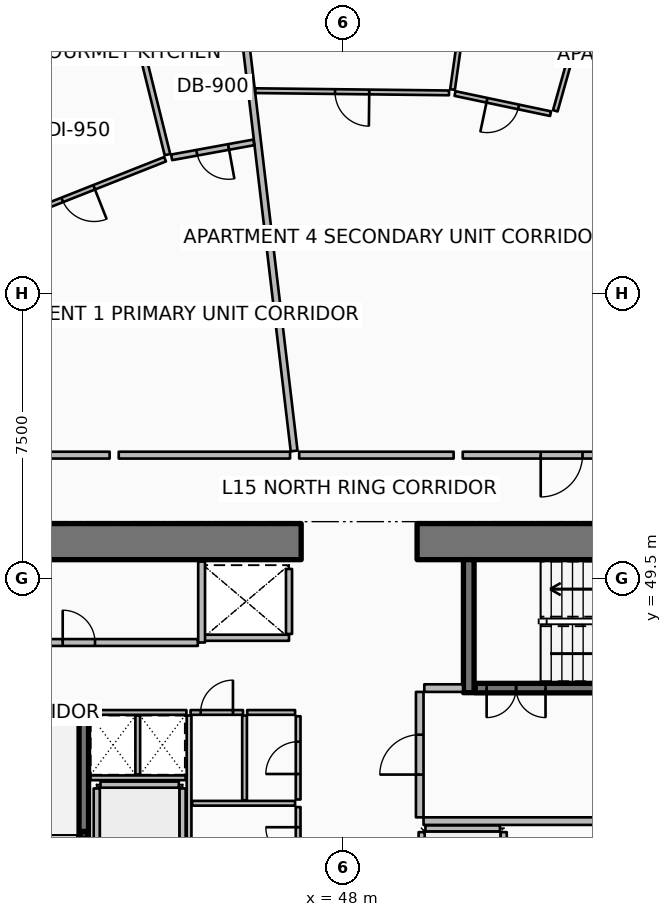
"""IFC4 building model, lengths in metres.
Left out: names, types, materials, properties, quantities, classifications, styles, units other than length and angle.
Written with IfcOpenShell. Run it as: python <this file> out.ifc"""

import sys

from ifc_helpers import new_model, si_unit, direction, frame, frame_2d, origin, origin_2d, place, context, subcontext, project, spatial, rectangle, hollow_rectangle, extrude, element, fill, save


model = new_model("IFC4")
c1 = context("Model", 3, precision=1e-05, world=origin(), true_north=direction((0.0, 1.0)))
c2 = subcontext(c1, "Body", "Model", "MODEL_VIEW")
j1 = project(units=[si_unit("LENGTHUNIT", "METRE"), si_unit("PLANEANGLEUNIT", "RADIAN")], contexts=[c1])
p1 = place(None, origin())
s1 = spatial("IfcSite", under=j1, at=p1, CompositionType="ELEMENT")
p2 = place(p1, origin())
s2 = spatial("IfcBuilding", under=s1, at=p2, CompositionType="ELEMENT")
p3 = place(p2, frame((0.0, 0.0, 63.9)))
s3 = spatial("IfcBuildingStorey", under=s2, at=p3, CompositionType="ELEMENT", Elevation=63.9)
p4 = place(p3, frame((36.85, 50.475, 0.0), z_axis=(0.0, 0.0, 1.0), x_axis=(1.0, 0.0, 0.0)))
e1 = element("IfcWall", 1, at=p4, inside=s3, PredefinedType="SHEAR", context=c2, shape_type="SweptSolid", body=[
    extrude(rectangle(XDim=10.05, YDim=0.95, at=frame_2d((5.025, 0.0))), origin(), (0.0, 0.0, 1.0), 3.75),
])
p5 = place(p3, frame((49.95, 50.475, 0.0), z_axis=(0.0, 0.0, 1.0), x_axis=(1.0, 0.0, 0.0)))
e2 = element("IfcWall", 2, at=p5, inside=s3, PredefinedType="SHEAR", context=c2, shape_type="SweptSolid", body=[
    extrude(rectangle(XDim=10.05, YDim=0.95, at=frame_2d((5.025, 0.0))), origin(), (0.0, 0.0, 1.0), 3.75),
])
for number, where, z_axis, x_axis in (
    (3, (37.8, 45.94, 0.0), (0.0, 0.0, 1.0), (1.0, 0.0, 0.0)),
    (4, (51.31, 46.5, 0.0), (0.0, 0.0, 1.0), (0.0, 1.0, 0.0)),
):
    element("IfcWall", number, at=place(p3, frame(where, z_axis=z_axis, x_axis=x_axis)), inside=s3, PredefinedType="SHEAR", context=c2, shape_type="SweptSolid", body=[
        extrude(rectangle(XDim=3.5, YDim=0.28, at=frame_2d((1.75, 0.0))), origin(), (0.0, 0.0, 1.0), 3.75),
    ])
p6 = place(p3, frame((41.18, 42.75, 0.0), z_axis=(0.0, 0.0, 1.0), x_axis=(1.0, 0.0, 0.0)))
e5 = element("IfcColumn", 5, at=p6, inside=s3, PredefinedType="COLUMN", context=c2, shape_type="SweptSolid", body=[
    extrude(hollow_rectangle(XDim=0.2, YDim=0.2, WallThickness=0.01, InnerFilletRadius=0.01, OuterFilletRadius=0.02, at=origin_2d()), origin(), (0.0, 0.0, 1.0), 1.67),
])
p7 = place(p3, frame((41.18, 38.22, 0.0), z_axis=(0.0, 0.0, 1.0), x_axis=(0.0, 1.0, 0.0)))
e6 = element("IfcWall", 6, at=p7, inside=s3, PredefinedType="SOLIDWALL", context=c2, shape_type="SweptSolid", body=[
    extrude(rectangle(XDim=7.56, YDim=0.25, at=frame_2d((3.78, 0.0))), origin(), (0.0, 0.0, 1.0), 3.5),
])
p8 = place(p7, frame((0.3, 0.0, 0.0)))
e7 = element("IfcOpeningElement", 7, at=p8, cuts=e6, PredefinedType="OPENING", context=c2, shape_type="SweptSolid", body=[
    extrude(rectangle(XDim=1.55, YDim=2.15, at=frame_2d((0.775, 1.075))), frame((0.0, 0.135, 0.0), z_axis=(0.0, -1.0, 0.0), x_axis=(1.0, 0.0, 0.0)), (0.0, 0.0, 1.0), 0.27),
])
p9 = place(p3, frame((51.48, 46.62, 0.0), z_axis=(0.0, 0.0, 1.0), x_axis=(1.0, 0.0, 0.0)))
e8 = element("IfcWall", 8, at=p9, inside=s3, PredefinedType="SOLIDWALL", context=c2, shape_type="SweptSolid", body=[
    extrude(rectangle(XDim=7.54, YDim=0.25, at=frame_2d((3.77, 0.0))), origin(), (0.0, 0.0, 1.0), 3.5),
])
p10 = place(p9, frame((0.3, 0.0, 0.0)))
e9 = element("IfcOpeningElement", 9, at=p10, cuts=e8, PredefinedType="OPENING", context=c2, shape_type="SweptSolid", body=[
    extrude(rectangle(XDim=1.55, YDim=2.15, at=frame_2d((0.775, 1.075))), frame((0.0, 0.135, 0.0), z_axis=(0.0, -1.0, 0.0), x_axis=(1.0, 0.0, 0.0)), (0.0, 0.0, 1.0), 0.27),
])
p11 = place(p3, frame((46.58, 47.945, 0.0), z_axis=(0.0, 0.0, 1.0), x_axis=(-1.0, 0.0, 0.0)))
e10 = element("IfcWall", 10, at=p11, inside=s3, PredefinedType="PARTITIONING", context=c2, shape_type="SweptSolid", body=[
    extrude(rectangle(XDim=2.26, YDim=0.16, at=frame_2d((1.13, 0.0))), origin(), (0.0, 0.0, 1.0), 3.5),
])
p12 = place(p3, frame((46.58, 48.045, 0.0), z_axis=(0.0, 0.0, 1.0), x_axis=(0.0, 1.0, 0.0)))
e11 = element("IfcWall", 11, at=p12, inside=s3, PredefinedType="PARTITIONING", context=c2, shape_type="SweptSolid", body=[
    extrude(rectangle(XDim=1.71, YDim=0.16, at=frame_2d((0.855, 0.0))), origin(), (0.0, 0.0, 1.0), 3.5),
])
for number, where, z_axis, x_axis in (
    (12, (43.78, 41.72, 0.0), (0.0, 0.0, 1.0), (0.0, 1.0, 0.0)),
    (13, (41.52, 41.72, 0.0), (0.0, 0.0, 1.0), (0.0, 1.0, 0.0)),
):
    element("IfcWall", number, at=place(p3, frame(where, z_axis=z_axis, x_axis=x_axis)), inside=s3, PredefinedType="PARTITIONING", context=c2, shape_type="SweptSolid", body=[
        extrude(rectangle(XDim=2.26, YDim=0.16, at=frame_2d((1.13, 0.0))), origin(), (0.0, 0.0, 1.0), 3.5),
    ])
p13 = place(p3, frame((41.62, 44.08, 0.0), z_axis=(0.0, 0.0, 1.0), x_axis=(1.0, 0.0, 0.0)))
e14 = element("IfcWall", 14, at=p13, inside=s3, PredefinedType="PARTITIONING", context=c2, shape_type="SweptSolid", body=[
    extrude(rectangle(XDim=2.06, YDim=0.16, at=frame_2d((1.03, 0.0))), origin(), (0.0, 0.0, 1.0), 3.5),
])
for number, where, z_axis, x_axis in (
    (15, (52.23, 40.67, 0.0), (0.0, 0.0, 1.0), (0.0, 1.0, 0.0)),
    (16, (50.07, 40.67, 0.0), (0.0, 0.0, 1.0), (0.0, 1.0, 0.0)),
):
    element("IfcWall", number, at=place(p3, frame(where, z_axis=z_axis, x_axis=x_axis)), inside=s3, PredefinedType="PARTITIONING", context=c2, shape_type="SweptSolid", body=[
        extrude(rectangle(XDim=2.16, YDim=0.16, at=frame_2d((1.08, 0.0))), origin(), (0.0, 0.0, 1.0), 3.5),
    ])
p14 = place(p3, frame((50.17, 42.93, 0.0), z_axis=(0.0, 0.0, 1.0), x_axis=(1.0, 0.0, 0.0)))
e17 = element("IfcWall", 17, at=p14, inside=s3, PredefinedType="PARTITIONING", context=c2, shape_type="SweptSolid", body=[
    extrude(rectangle(XDim=1.96, YDim=0.16, at=frame_2d((0.98, 0.0))), origin(), (0.0, 0.0, 1.0), 3.5),
])
p15 = place(p3, frame((37.92, 47.82, 0.0), z_axis=(0.0, 0.0, 1.0), x_axis=(1.0, 0.0, 0.0)))
e18 = element("IfcWall", 18, at=p15, inside=s3, PredefinedType="PARTITIONING", context=c2, shape_type="SweptSolid", body=[
    extrude(rectangle(XDim=6.26, YDim=0.18, at=frame_2d((3.13, 0.0))), origin(), (0.0, 0.0, 1.0), 3.5),
])
p16 = place(p15, frame((2.705, 0.0, 0.0)))
e19 = element("IfcOpeningElement", 19, at=p16, cuts=e18, PredefinedType="OPENING", context=c2, shape_type="SweptSolid", body=[
    extrude(rectangle(XDim=0.85, YDim=2.06, at=frame_2d((0.425, 1.03))), frame((0.0, 0.1, 0.0), z_axis=(0.0, -1.0, 0.0), x_axis=(1.0, 0.0, 0.0)), (0.0, 0.0, 1.0), 0.2),
])
p17 = place(p3, frame((44.28, 47.82, 0.0), z_axis=(0.0, 0.0, 1.0), x_axis=(0.0, 1.0, 0.0)))
e20 = element("IfcWall", 20, at=p17, inside=s3, PredefinedType="PARTITIONING", context=c2, shape_type="SweptSolid", body=[
    extrude(rectangle(XDim=2.13, YDim=0.18, at=frame_2d((1.065, 0.0))), origin(), (0.0, 0.0, 1.0), 3.5),
])
p18 = place(p3, frame((50.12, 43.12, 0.0), z_axis=(0.0, 0.0, 1.0), x_axis=(1.0, 0.0, 0.0)))
e21 = element("IfcWall", 21, at=p18, inside=s3, PredefinedType="PARTITIONING", context=c2, shape_type="SweptSolid", body=[
    extrude(rectangle(XDim=8.88, YDim=0.2, at=frame_2d((4.44, 0.0))), origin(), (0.0, 0.0, 1.0), 3.5),
])
p19 = place(p3, frame((50.14, 46.62, 0.0), z_axis=(0.0, 0.0, 1.0), x_axis=(1.0, 0.0, 0.0)))
e22 = element("IfcWall", 22, at=p19, inside=s3, PredefinedType="PARTITIONING", context=c2, shape_type="SweptSolid", body=[
    extrude(rectangle(XDim=1.02, YDim=0.2, at=frame_2d((0.51, 0.0))), origin(), (0.0, 0.0, 1.0), 3.5),
])
p20 = place(p3, frame((50.02, 43.22, 0.0), z_axis=(0.0, 0.0, 1.0), x_axis=(0.0, 1.0, 0.0)))
e23 = element("IfcWall", 23, at=p20, inside=s3, PredefinedType="PARTITIONING", context=c2, shape_type="SweptSolid", body=[
    extrude(rectangle(XDim=3.3, YDim=0.2, at=frame_2d((1.65, 0.0))), origin(), (0.0, 0.0, 1.0), 3.5),
])
p21 = place(p20, frame((1.125, 0.0, 0.0)))
e24 = element("IfcOpeningElement", 24, at=p21, cuts=e23, PredefinedType="OPENING", context=c2, shape_type="SweptSolid", body=[
    extrude(rectangle(XDim=1.05, YDim=2.1, at=frame_2d((0.525, 1.05))), frame((0.0, 0.11, 0.0), z_axis=(0.0, -1.0, 0.0), x_axis=(1.0, 0.0, 0.0)), (0.0, 0.0, 1.0), 0.22),
])
p22 = place(p3, frame((41.36, 44.26, 0.0), z_axis=(0.0, 0.0, 1.0), x_axis=(1.0, 0.0, 0.0)))
e25 = element("IfcWall", 25, at=p22, inside=s3, PredefinedType="PARTITIONING", context=c2, shape_type="SweptSolid", body=[
    extrude(rectangle(XDim=2.5, YDim=0.125, at=frame_2d((1.25, 0.0))), origin(), (0.0, 0.0, 1.0), 2.94),
])
p23 = place(p3, frame((42.6, 44.35, 0.0), z_axis=(0.0, 0.0, 1.0), x_axis=(0.0, 1.0, 0.0)))
e26 = element("IfcWall", 26, at=p23, inside=s3, PredefinedType="PARTITIONING", context=c2, shape_type="SweptSolid", body=[
    extrude(rectangle(XDim=1.55, YDim=0.125, at=frame_2d((0.775, 0.0))), origin(), (0.0, 0.0, 1.0), 2.94),
])
p24 = place(p3, frame((43.95, 41.58, 0.0), z_axis=(0.0, 0.0, 1.0), x_axis=(0.0, 1.0, 0.0)))
e27 = element("IfcWall", 27, at=p24, inside=s3, PredefinedType="PARTITIONING", context=c2, shape_type="SweptSolid", body=[
    extrude(rectangle(XDim=4.32, YDim=0.125, at=frame_2d((2.16, 0.0))), origin(), (0.0, 0.0, 1.0), 2.94),
])
p25 = place(p3, frame((44.03, 43.59, 0.0), z_axis=(0.0, 0.0, 1.0), x_axis=(1.0, 0.0, 0.0)))
e28 = element("IfcWall", 28, at=p25, inside=s3, PredefinedType="PARTITIONING", context=c2, shape_type="SweptSolid", body=[
    extrude(rectangle(XDim=2.71, YDim=0.125, at=frame_2d((1.355, 0.0))), origin(), (0.0, 0.0, 1.0), 2.94),
])
p26 = place(p3, frame((45.41, 43.67, 0.0), z_axis=(0.0, 0.0, 1.0), x_axis=(0.0, 1.0, 0.0)))
e29 = element("IfcWall", 29, at=p26, inside=s3, PredefinedType="PARTITIONING", context=c2, shape_type="SweptSolid", body=[
    extrude(rectangle(XDim=2.23, YDim=0.125, at=frame_2d((1.115, 0.0))), origin(), (0.0, 0.0, 1.0), 2.94),
])
p27 = place(p3, frame((46.82, 41.58, 0.0), z_axis=(0.0, 0.0, 1.0), x_axis=(0.0, 1.0, 0.0)))
e30 = element("IfcWall", 30, at=p27, inside=s3, PredefinedType="PARTITIONING", context=c2, shape_type="SweptSolid", body=[
    extrude(rectangle(XDim=1.91, YDim=0.125, at=frame_2d((0.955, 0.0))), origin(), (0.0, 0.0, 1.0), 2.94),
])
p28 = place(p27, frame((0.53, 0.0, 0.0)))
e31 = element("IfcOpeningElement", 31, at=p28, cuts=e30, PredefinedType="OPENING", context=c2, shape_type="SweptSolid", body=[
    extrude(rectangle(XDim=0.85, YDim=2.06, at=frame_2d((0.425, 1.03))), frame((0.0, 0.073, 0.0), z_axis=(0.0, -1.0, 0.0), x_axis=(1.0, 0.0, 0.0)), (0.0, 0.0, 1.0), 0.145),
])
p29 = place(p3, frame((46.82, 43.69, 0.0), z_axis=(0.0, 0.0, 1.0), x_axis=(0.0, 1.0, 0.0)))
e32 = element("IfcWall", 32, at=p29, inside=s3, PredefinedType="PARTITIONING", context=c2, shape_type="SweptSolid", body=[
    extrude(rectangle(XDim=2.19, YDim=0.125, at=frame_2d((1.095, 0.0))), origin(), (0.0, 0.0, 1.0), 2.94),
])
p30 = place(p29, frame((0.67, 0.0, 0.0)))
e33 = element("IfcOpeningElement", 33, at=p30, cuts=e32, PredefinedType="OPENING", context=c2, shape_type="SweptSolid", body=[
    extrude(rectangle(XDim=0.85, YDim=2.06, at=frame_2d((0.425, 1.03))), frame((0.0, 0.073, 0.0), z_axis=(0.0, -1.0, 0.0), x_axis=(1.0, 0.0, 0.0)), (0.0, 0.0, 1.0), 0.145),
])
p31 = place(p3, frame((41.35, 45.98, 0.0), z_axis=(0.0, 0.0, 1.0), x_axis=(1.0, 0.0, 0.0)))
e34 = element("IfcWall", 34, at=p31, inside=s3, PredefinedType="PARTITIONING", context=c2, shape_type="SweptSolid", body=[
    extrude(rectangle(XDim=2.53, YDim=0.125, at=frame_2d((1.265, 0.0))), origin(), (0.0, 0.0, 1.0), 2.94),
])
p32 = place(p3, frame((43.99, 45.98, 0.0), z_axis=(0.0, 0.0, 1.0), x_axis=(1.0, 0.0, 0.0)))
e35 = element("IfcWall", 35, at=p32, inside=s3, PredefinedType="PARTITIONING", context=c2, shape_type="SweptSolid", body=[
    extrude(rectangle(XDim=1.38, YDim=0.125, at=frame_2d((0.69, 0.0))), origin(), (0.0, 0.0, 1.0), 2.94),
])
p33 = place(p32, frame((0.265, 0.0, 0.0)))
e36 = element("IfcOpeningElement", 36, at=p33, cuts=e35, PredefinedType="OPENING", context=c2, shape_type="SweptSolid", body=[
    extrude(rectangle(XDim=0.85, YDim=2.06, at=frame_2d((0.425, 1.03))), frame((0.0, 0.073, 0.0), z_axis=(0.0, -1.0, 0.0), x_axis=(1.0, 0.0, 0.0)), (0.0, 0.0, 1.0), 0.145),
])
p34 = place(p3, frame((45.48, 45.98, 0.0), z_axis=(0.0, 0.0, 1.0), x_axis=(1.0, 0.0, 0.0)))
e37 = element("IfcWall", 37, at=p34, inside=s3, PredefinedType="PARTITIONING", context=c2, shape_type="SweptSolid", body=[
    extrude(rectangle(XDim=1.26, YDim=0.125, at=frame_2d((0.63, 0.0))), origin(), (0.0, 0.0, 1.0), 2.94),
])
p35 = place(p3, frame((46.715, 52.859, 0.0), z_axis=(0.0, 0.0, 1.0), x_axis=(-0.117534950089, 0.993068746617, 0.0)))
e38 = element("IfcWall", 38, at=p35, inside=s3, PredefinedType="PARTITIONING", context=c2, shape_type="SweptSolid", body=[
    extrude(rectangle(XDim=14.661, YDim=0.18, at=frame_2d((7.33, 0.0))), origin(), (0.0, 0.0, 1.0), 2.867),
])
p36 = place(p3, frame((41.86, 52.75, 0.0), z_axis=(0.0, 0.0, 1.0), x_axis=(-1.0, 0.0, 0.0)))
e39 = element("IfcWall", 39, at=p36, inside=s3, PredefinedType="PARTITIONING", context=c2, shape_type="SweptSolid", body=[
    extrude(rectangle(XDim=6.69, YDim=0.18, at=frame_2d((3.345, 0.0))), origin(), (0.0, 0.0, 1.0), 2.867),
])
p37 = place(p36, frame((2.795, 0.0, 0.0)))
e40 = element("IfcOpeningElement", 40, at=p37, cuts=e39, PredefinedType="OPENING", context=c2, shape_type="SweptSolid", body=[
    extrude(rectangle(XDim=1.1, YDim=2.1, at=frame_2d((0.55, 1.05))), frame((0.0, 0.1, 0.0), z_axis=(0.0, -1.0, 0.0), x_axis=(1.0, 0.0, 0.0)), (0.0, 0.0, 1.0), 0.2),
])
p38 = place(p3, frame((46.608, 52.75, 0.0), z_axis=(0.0, 0.0, 1.0), x_axis=(-1.0, 0.0, 0.0)))
e41 = element("IfcWall", 41, at=p38, inside=s3, PredefinedType="PARTITIONING", context=c2, shape_type="SweptSolid", body=[
    extrude(rectangle(XDim=4.508, YDim=0.18, at=frame_2d((2.254, 0.0))), origin(), (0.0, 0.0, 1.0), 2.867),
])
p39 = place(p3, frame((45.653, 60.979, 0.0), z_axis=(0.0, 0.0, 1.0), x_axis=(-0.983791601568, -0.179315600783, 0.0)))
e42 = element("IfcWall", 42, at=p39, inside=s3, PredefinedType="PARTITIONING", context=c2, shape_type="SweptSolid", body=[
    extrude(rectangle(XDim=2.198, YDim=0.15, at=frame_2d((1.099, 0.0))), origin(), (0.0, 0.0, 1.0), 2.867),
])
p40 = place(p39, frame((0.674, 0.0, 0.0)))
e43 = element("IfcOpeningElement", 43, at=p40, cuts=e42, PredefinedType="OPENING", context=c2, shape_type="SweptSolid", body=[
    extrude(rectangle(XDim=0.85, YDim=2.06, at=frame_2d((0.425, 1.03))), frame((0.0, 0.085, 0.0), z_axis=(0.0, -1.0, 0.0), x_axis=(1.0, 0.0, 0.0)), (0.0, 0.0, 1.0), 0.17),
])
p41 = place(p3, frame((43.381, 60.657, 0.0), z_axis=(0.0, 0.0, 1.0), x_axis=(-0.240281337946, 0.97070329073, 0.0)))
e44 = element("IfcWall", 44, at=p41, inside=s3, PredefinedType="PARTITIONING", context=c2, shape_type="SweptSolid", body=[
    extrude(rectangle(XDim=4.104, YDim=0.15, at=frame_2d((2.052, 0.0))), origin(), (0.0, 0.0, 1.0), 2.94),
])
p42 = place(p3, frame((43.319, 60.536, 0.0), z_axis=(0.0, 0.0, 1.0), x_axis=(-0.929910978534, -0.367784681576, 0.0)))
e45 = element("IfcWall", 45, at=p42, inside=s3, PredefinedType="PARTITIONING", context=c2, shape_type="SweptSolid", body=[
    extrude(rectangle(XDim=4.918, YDim=0.125, at=frame_2d((2.459, 0.0))), origin(), (0.0, 0.0, 1.0), 2.867),
])
p43 = place(p42, frame((2.009, 0.0, 0.0)))
e46 = element("IfcOpeningElement", 46, at=p43, cuts=e45, PredefinedType="OPENING", context=c2, shape_type="SweptSolid", body=[
    extrude(rectangle(XDim=0.9, YDim=2.08, at=frame_2d((0.45, 1.04))), frame((0.0, 0.073, 0.0), z_axis=(0.0, -1.0, 0.0), x_axis=(1.0, 0.0, 0.0)), (0.0, 0.0, 1.0), 0.145),
])
p44 = place(p3, frame((56.354, 52.75, 0.0), z_axis=(0.0, 0.0, 1.0), x_axis=(-1.0, 0.0, 0.0)))
e47 = element("IfcWall", 47, at=p44, inside=s3, PredefinedType="PARTITIONING", context=c2, shape_type="SweptSolid", body=[
    extrude(rectangle(XDim=5.203, YDim=0.18, at=frame_2d((2.601, 0.0))), origin(), (0.0, 0.0, 1.0), 2.867),
])
p45 = place(p44, frame((2.052, 0.0, 0.0)))
e48 = element("IfcOpeningElement", 48, at=p45, cuts=e47, PredefinedType="OPENING", context=c2, shape_type="SweptSolid", body=[
    extrude(rectangle(XDim=1.1, YDim=2.1, at=frame_2d((0.55, 1.05))), frame((0.0, 0.1, 0.0), z_axis=(0.0, -1.0, 0.0), x_axis=(1.0, 0.0, 0.0)), (0.0, 0.0, 1.0), 0.2),
])
p46 = place(p3, frame((50.912, 52.75, 0.0), z_axis=(0.0, 0.0, 1.0), x_axis=(-1.0, 0.0, 0.0)))
e49 = element("IfcWall", 49, at=p46, inside=s3, PredefinedType="PARTITIONING", context=c2, shape_type="SweptSolid", body=[
    extrude(rectangle(XDim=4.064, YDim=0.18, at=frame_2d((2.032, 0.0))), origin(), (0.0, 0.0, 1.0), 2.867),
])
p47 = place(p3, frame((53.587, 61.81, 0.0), z_axis=(0.0, 0.0, 1.0), x_axis=(0.271464088879, 0.962448569249, 0.0)))
e50 = element("IfcWall", 50, at=p47, inside=s3, PredefinedType="PARTITIONING", context=c2, shape_type="SweptSolid", body=[
    extrude(rectangle(XDim=7.389, YDim=0.125, at=frame_2d((3.695, 0.0))), origin(), (0.0, 0.0, 1.0), 2.867),
])
p48 = place(p3, frame((50.883, 62.37, 0.0), z_axis=(0.0, 0.0, 1.0), x_axis=(0.140126411414, 0.990133621702, 0.0)))
e51 = element("IfcWall", 51, at=p48, inside=s3, PredefinedType="PARTITIONING", context=c2, shape_type="SweptSolid", body=[
    extrude(rectangle(XDim=6.124, YDim=0.125, at=frame_2d((3.062, 0.0))), origin(), (0.0, 0.0, 1.0), 2.94),
])
p49 = place(p3, frame((53.462, 61.735, 0.0), z_axis=(0.0, 0.0, 1.0), x_axis=(-0.978499333356, 0.206249980902, 0.0)))
e52 = element("IfcWall", 52, at=p49, inside=s3, PredefinedType="PARTITIONING", context=c2, shape_type="SweptSolid", body=[
    extrude(rectangle(XDim=2.569, YDim=0.125, at=frame_2d((1.284, 0.0))), origin(), (0.0, 0.0, 1.0), 2.867),
])
p50 = place(p49, frame((0.859, 0.0, 0.0)))
e53 = element("IfcOpeningElement", 53, at=p50, cuts=e52, PredefinedType="OPENING", context=c2, shape_type="SweptSolid", body=[
    extrude(rectangle(XDim=0.85, YDim=2.06, at=frame_2d((0.425, 1.03))), frame((0.0, 0.073, 0.0), z_axis=(0.0, -1.0, 0.0), x_axis=(1.0, 0.0, 0.0)), (0.0, 0.0, 1.0), 0.145),
])
p51 = place(p3, frame((50.79, 62.282, 0.0), z_axis=(0.0, 0.0, 1.0), x_axis=(-0.99993505002, 0.011397181261, 0.0)))
e54 = element("IfcWall", 54, at=p51, inside=s3, PredefinedType="PARTITIONING", context=c2, shape_type="SweptSolid", body=[
    extrude(rectangle(XDim=5.098, YDim=0.125, at=frame_2d((2.549, 0.0))), origin(), (0.0, 0.0, 1.0), 2.867),
])
p52 = place(p51, frame((2.099, 0.0, 0.0)))
e55 = element("IfcOpeningElement", 55, at=p52, cuts=e54, PredefinedType="OPENING", context=c2, shape_type="SweptSolid", body=[
    extrude(rectangle(XDim=0.9, YDim=2.08, at=frame_2d((0.45, 1.04))), frame((0.0, 0.073, 0.0), z_axis=(0.0, -1.0, 0.0), x_axis=(1.0, 0.0, 0.0)), (0.0, 0.0, 1.0), 0.145),
])
p53 = place(p10, origin())
e56 = element("IfcDoor", 56, at=p53, inside=s3, OperationType="DOUBLE_DOOR_SINGLE_SWING", PredefinedType="DOOR", context=c2, shape_type="SweptSolid", body=[
    extrude(rectangle(XDim=1.55, YDim=2.15, at=frame_2d((0.775, 1.075))), frame((0.0, 0.025, 0.0), z_axis=(0.0, -1.0, 0.0), x_axis=(1.0, 0.0, 0.0)), (0.0, 0.0, 1.0), 0.05),
])
fill(e9, e56)
p54 = place(p16, origin())
e57 = element("IfcDoor", 57, at=p54, inside=s3, OperationType="SINGLE_SWING_LEFT", PredefinedType="DOOR", context=c2, shape_type="SweptSolid", body=[
    extrude(rectangle(XDim=0.85, YDim=2.06, at=frame_2d((0.425, 1.03))), frame((0.0, 0.025, 0.0), z_axis=(0.0, -1.0, 0.0), x_axis=(1.0, 0.0, 0.0)), (0.0, 0.0, 1.0), 0.05),
])
fill(e19, e57)
p55 = place(p21, origin())
e58 = element("IfcDoor", 58, at=p55, inside=s3, OperationType="SINGLE_SWING_LEFT", PredefinedType="DOOR", context=c2, shape_type="SweptSolid", body=[
    extrude(rectangle(XDim=1.05, YDim=2.1, at=frame_2d((0.525, 1.05))), frame((0.0, 0.025, 0.0), z_axis=(0.0, -1.0, 0.0), x_axis=(1.0, 0.0, 0.0)), (0.0, 0.0, 1.0), 0.05),
])
fill(e24, e58)
p56 = place(p28, origin())
e59 = element("IfcDoor", 59, at=p56, inside=s3, OperationType="SINGLE_SWING_RIGHT", PredefinedType="DOOR", context=c2, shape_type="SweptSolid", body=[
    extrude(rectangle(XDim=0.85, YDim=2.06, at=frame_2d((0.425, 1.03))), frame((0.0, 0.025, 0.0), z_axis=(0.0, -1.0, 0.0), x_axis=(1.0, 0.0, 0.0)), (0.0, 0.0, 1.0), 0.05),
])
fill(e31, e59)
p57 = place(p30, origin())
e60 = element("IfcDoor", 60, at=p57, inside=s3, OperationType="SINGLE_SWING_LEFT", PredefinedType="DOOR", context=c2, shape_type="SweptSolid", body=[
    extrude(rectangle(XDim=0.85, YDim=2.06, at=frame_2d((0.425, 1.03))), frame((0.0, 0.025, 0.0), z_axis=(0.0, -1.0, 0.0), x_axis=(1.0, 0.0, 0.0)), (0.0, 0.0, 1.0), 0.05),
])
fill(e33, e60)
p58 = place(p33, origin())
e61 = element("IfcDoor", 61, at=p58, inside=s3, OperationType="SINGLE_SWING_RIGHT", PredefinedType="DOOR", context=c2, shape_type="SweptSolid", body=[
    extrude(rectangle(XDim=0.85, YDim=2.06, at=frame_2d((0.425, 1.03))), frame((0.0, 0.025, 0.0), z_axis=(0.0, -1.0, 0.0), x_axis=(1.0, 0.0, 0.0)), (0.0, 0.0, 1.0), 0.05),
])
fill(e36, e61)
p59 = place(p40, origin())
e62 = element("IfcDoor", 62, at=p59, inside=s3, OperationType="SINGLE_SWING_LEFT", PredefinedType="DOOR", context=c2, shape_type="SweptSolid", body=[
    extrude(rectangle(XDim=0.85, YDim=2.06, at=frame_2d((0.425, 1.03))), frame((0.0, 0.025, 0.0), z_axis=(0.0, -1.0, 0.0), x_axis=(1.0, 0.0, 0.0)), (0.0, 0.0, 1.0), 0.05),
])
fill(e43, e62)
p60 = place(p43, origin())
e63 = element("IfcDoor", 63, at=p60, inside=s3, OperationType="SINGLE_SWING_LEFT", PredefinedType="DOOR", context=c2, shape_type="SweptSolid", body=[
    extrude(rectangle(XDim=0.9, YDim=2.08, at=frame_2d((0.45, 1.04))), frame((0.0, 0.025, 0.0), z_axis=(0.0, -1.0, 0.0), x_axis=(1.0, 0.0, 0.0)), (0.0, 0.0, 1.0), 0.05),
])
fill(e46, e63)
p61 = place(p45, origin())
e64 = element("IfcDoor", 64, at=p61, inside=s3, OperationType="SINGLE_SWING_RIGHT", PredefinedType="DOOR", context=c2, shape_type="SweptSolid", body=[
    extrude(rectangle(XDim=1.1, YDim=2.1, at=frame_2d((0.55, 1.05))), frame((0.0, 0.025, 0.0), z_axis=(0.0, -1.0, 0.0), x_axis=(1.0, 0.0, 0.0)), (0.0, 0.0, 1.0), 0.05),
])
fill(e48, e64)
p62 = place(p50, origin())
e65 = element("IfcDoor", 65, at=p62, inside=s3, OperationType="SINGLE_SWING_RIGHT", PredefinedType="DOOR", context=c2, shape_type="SweptSolid", body=[
    extrude(rectangle(XDim=0.85, YDim=2.06, at=frame_2d((0.425, 1.03))), frame((0.0, 0.025, 0.0), z_axis=(0.0, -1.0, 0.0), x_axis=(1.0, 0.0, 0.0)), (0.0, 0.0, 1.0), 0.05),
])
fill(e53, e65)
p63 = place(p52, origin())
e66 = element("IfcDoor", 66, at=p63, inside=s3, OperationType="SINGLE_SWING_LEFT", PredefinedType="DOOR", context=c2, shape_type="SweptSolid", body=[
    extrude(rectangle(XDim=0.9, YDim=2.08, at=frame_2d((0.45, 1.04))), frame((0.0, 0.025, 0.0), z_axis=(0.0, -1.0, 0.0), x_axis=(1.0, 0.0, 0.0)), (0.0, 0.0, 1.0), 0.05),
])
fill(e55, e66)
save(model, sys.argv[1])
